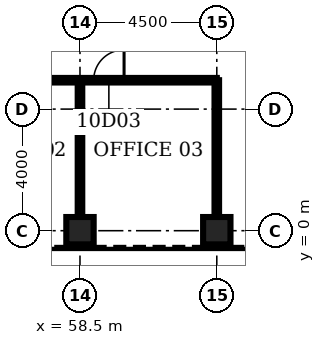
"""IFC4 building model, lengths in metres.
Left out: names, types, materials, properties, quantities, classifications, styles, units other than length and angle.
Written with IfcOpenShell. Run it as: python <this file> out.ifc"""

import sys

from ifc_helpers import new_model, si_unit, direction, frame, frame_2d, origin, origin_2d, place, context, subcontext, project, spatial, rectangle, hollow_rectangle, extrude, element, fill, save


model = new_model("IFC4")
c1 = context("Model", 3, precision=1e-05, world=origin(), true_north=direction((0.0, 1.0)))
c2 = subcontext(c1, "Body", "Model", "MODEL_VIEW")
j1 = project(units=[si_unit("LENGTHUNIT", "METRE"), si_unit("PLANEANGLEUNIT", "RADIAN")], contexts=[c1])
p1 = place(None, origin())
s1 = spatial("IfcSite", under=j1, at=p1, CompositionType="ELEMENT")
p2 = place(p1, origin())
s2 = spatial("IfcBuilding", under=s1, at=p2, CompositionType="ELEMENT")
p3 = place(p2, frame((0.0, 0.0, 50.0)))
s3 = spatial("IfcBuildingStorey", under=s2, at=p3, CompositionType="ELEMENT", Elevation=50.0)
for number, where, z_axis, x_axis in (
    (1, (58.5, 0.0, 0.0), (0.0, 0.0, 1.0), (0.0, 1.0, 0.0)),
    (2, (63.0, 0.0, 0.0), (0.0, 0.0, 1.0), (0.0, 1.0, 0.0)),
):
    element("IfcColumn", number, at=place(p3, frame(where, z_axis=z_axis, x_axis=x_axis)), inside=s3, PredefinedType="COLUMN", context=c2, shape_type="SweptSolid", body=[
        extrude(hollow_rectangle(XDim=0.9, YDim=0.9, WallThickness=0.12, at=origin_2d()), origin(), (0.0, 0.0, 1.0), 4.5),
    ])
p4 = place(p3, frame((49.5, 4.95, 0.0), z_axis=(0.0, 0.0, 1.0), x_axis=(1.0, 0.0, 0.0)))
e3 = element("IfcWall", 3, at=p4, inside=s3, PredefinedType="PARTITIONING", context=c2, shape_type="SweptSolid", body=[
    extrude(rectangle(XDim=13.5, YDim=0.15, at=frame_2d((6.75, 0.0))), origin(), (0.0, 0.0, 1.0), 3.0),
])
p5 = place(p4, frame((0.45, 0.0, 0.0)))
e4 = element("IfcOpeningElement", 4, at=p5, cuts=e3, PredefinedType="OPENING", context=c2, shape_type="SweptSolid", body=[
    extrude(rectangle(XDim=1.0, YDim=2.1, at=frame_2d((0.5, 1.05))), frame((0.0, 0.085, 0.0), z_axis=(0.0, -1.0, 0.0), x_axis=(1.0, 0.0, 0.0)), (0.0, 0.0, 1.0), 0.17),
])
p6 = place(p4, frame((4.95, 0.0, 0.0)))
e5 = element("IfcOpeningElement", 5, at=p6, cuts=e3, PredefinedType="OPENING", context=c2, shape_type="SweptSolid", body=[
    extrude(rectangle(XDim=1.0, YDim=2.1, at=frame_2d((0.5, 1.05))), frame((0.0, 0.085, 0.0), z_axis=(0.0, -1.0, 0.0), x_axis=(1.0, 0.0, 0.0)), (0.0, 0.0, 1.0), 0.17),
])
p7 = place(p4, frame((9.45, 0.0, 0.0)))
e6 = element("IfcOpeningElement", 6, at=p7, cuts=e3, PredefinedType="OPENING", context=c2, shape_type="SweptSolid", body=[
    extrude(rectangle(XDim=1.0, YDim=2.1, at=frame_2d((0.5, 1.05))), frame((0.0, 0.085, 0.0), z_axis=(0.0, -1.0, 0.0), x_axis=(1.0, 0.0, 0.0)), (0.0, 0.0, 1.0), 0.17),
])
for number, where, z_axis, x_axis in (
    (7, (58.5, 0.45, 0.0), (0.0, 0.0, 1.0), (0.0, 1.0, 0.0)),
    (8, (63.0, 0.45, 0.0), (0.0, 0.0, 1.0), (0.0, 1.0, 0.0)),
):
    element("IfcWall", number, at=place(p3, frame(where, z_axis=z_axis, x_axis=x_axis)), inside=s3, PredefinedType="PARTITIONING", context=c2, shape_type="SweptSolid", body=[
        extrude(rectangle(XDim=4.5, YDim=0.15, at=frame_2d((2.25, 0.0))), origin(), (0.0, 0.0, 1.0), 3.0),
    ])
p8 = place(p7, origin())
e9 = element("IfcDoor", 9, at=p8, inside=s3, OperationType="SINGLE_SWING_RIGHT", PredefinedType="DOOR", context=c2, shape_type="SweptSolid", body=[
    extrude(rectangle(XDim=1.0, YDim=2.1, at=frame_2d((0.5, 1.05))), frame((0.0, 0.025, 0.0), z_axis=(0.0, -1.0, 0.0), x_axis=(1.0, 0.0, 0.0)), (0.0, 0.0, 1.0), 0.05),
])
fill(e6, e9)
save(model, sys.argv[1])
